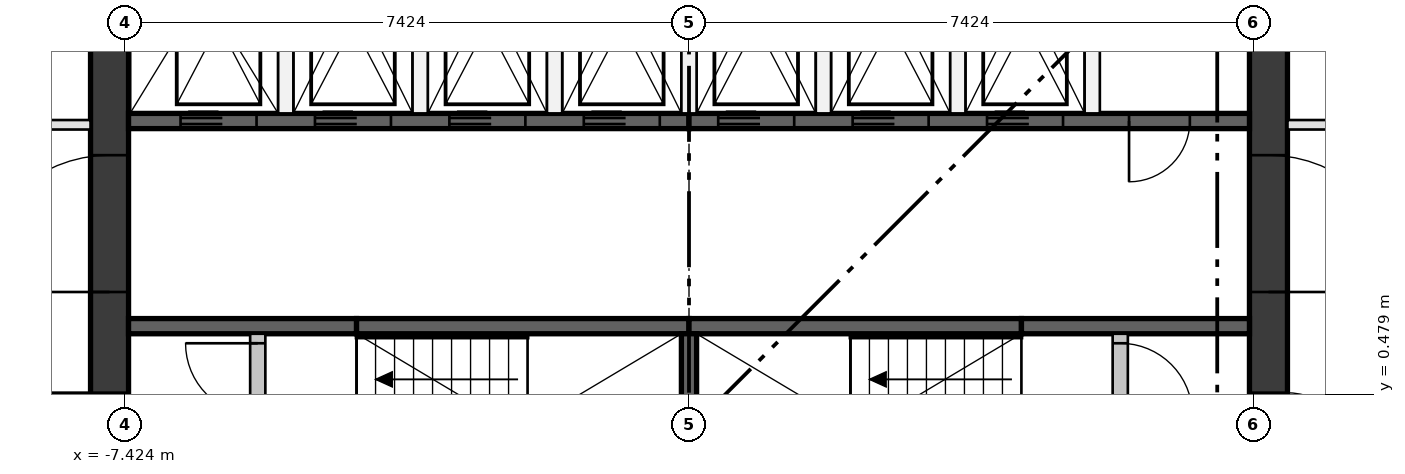
"""IFC4 building model, lengths in metres.
Left out: names, types, materials, properties, quantities, classifications, styles, units other than length and angle.
Written with IfcOpenShell. Run it as: python <this file> out.ifc"""

import sys

from ifc_helpers import new_model, si_unit, direction, frame, frame_2d, origin, place, context, subcontext, project, spatial, rectangle, extrude, element, fill, save


model = new_model("IFC4")
c1 = context("Model", 3, precision=1e-05, world=origin(), true_north=direction((0.0, 1.0)))
c2 = subcontext(c1, "Body", "Model", "MODEL_VIEW")
j1 = project(units=[si_unit("LENGTHUNIT", "METRE"), si_unit("PLANEANGLEUNIT", "RADIAN")], contexts=[c1])
p1 = place(None, origin())
s1 = spatial("IfcSite", under=j1, at=p1, CompositionType="ELEMENT")
p2 = place(p1, origin())
s2 = spatial("IfcBuilding", under=s1, at=p2, CompositionType="ELEMENT")
p3 = place(p2, frame((0.0, 0.0, 217.8)))
s3 = spatial("IfcBuildingStorey", under=s2, at=p3, CompositionType="ELEMENT", Elevation=217.8)
p4 = place(p3, frame((-7.624, -7.374, 0.0), z_axis=(0.0, 0.0, 1.0), x_axis=(0.0, 1.0, 0.0)))
e1 = element("IfcWall", 1, at=p4, inside=s3, PredefinedType="SHEAR", context=c2, shape_type="SweptSolid", body=[
    extrude(rectangle(XDim=14.748, YDim=0.5, at=frame_2d((7.374, 0.0))), origin(), (0.0, 0.0, 1.0), 3.35),
])
p5 = place(p4, frame((6.874, 0.0, 0.0)))
e2 = element("IfcOpeningElement", 2, at=p5, cuts=e1, PredefinedType="OPENING", context=c2, shape_type="SweptSolid", body=[
    extrude(rectangle(XDim=1.0, YDim=2.1, at=frame_2d((0.5, 1.05))), frame((0.0, 0.26, 0.0), z_axis=(0.0, -1.0, 0.0), x_axis=(1.0, 0.0, 0.0)), (0.0, 0.0, 1.0), 0.52),
])
p6 = place(p4, frame((3.75, 0.0, 0.0)))
e3 = element("IfcOpeningElement", 3, at=p6, cuts=e1, PredefinedType="OPENING", context=c2, shape_type="SweptSolid", body=[
    extrude(rectangle(XDim=1.8, YDim=2.1, at=frame_2d((0.9, 1.05))), frame((0.0, 0.26, 0.0), z_axis=(0.0, -1.0, 0.0), x_axis=(1.0, 0.0, 0.0)), (0.0, 0.0, 1.0), 0.52),
])
p7 = place(p4, frame((9.198, 0.0, 0.0)))
e4 = element("IfcOpeningElement", 4, at=p7, cuts=e1, PredefinedType="OPENING", context=c2, shape_type="SweptSolid", body=[
    extrude(rectangle(XDim=1.8, YDim=2.1, at=frame_2d((0.9, 1.05))), frame((0.0, 0.26, 0.0), z_axis=(0.0, -1.0, 0.0), x_axis=(1.0, 0.0, 0.0)), (0.0, 0.0, 1.0), 0.52),
])
p8 = place(p3, frame((7.624, -7.374, 0.0), z_axis=(0.0, 0.0, 1.0), x_axis=(0.0, 1.0, 0.0)))
e5 = element("IfcWall", 5, at=p8, inside=s3, PredefinedType="SHEAR", context=c2, shape_type="SweptSolid", body=[
    extrude(rectangle(XDim=14.748, YDim=0.5, at=frame_2d((7.374, 0.0))), origin(), (0.0, 0.0, 1.0), 3.35),
])
p9 = place(p8, frame((6.874, 0.0, 0.0)))
e6 = element("IfcOpeningElement", 6, at=p9, cuts=e5, PredefinedType="OPENING", context=c2, shape_type="SweptSolid", body=[
    extrude(rectangle(XDim=1.0, YDim=2.1, at=frame_2d((0.5, 1.05))), frame((0.0, 0.26, 0.0), z_axis=(0.0, -1.0, 0.0), x_axis=(1.0, 0.0, 0.0)), (0.0, 0.0, 1.0), 0.52),
])
p10 = place(p8, frame((3.75, 0.0, 0.0)))
e7 = element("IfcOpeningElement", 7, at=p10, cuts=e5, PredefinedType="OPENING", context=c2, shape_type="SweptSolid", body=[
    extrude(rectangle(XDim=1.8, YDim=2.1, at=frame_2d((0.9, 1.05))), frame((0.0, 0.26, 0.0), z_axis=(0.0, -1.0, 0.0), x_axis=(1.0, 0.0, 0.0)), (0.0, 0.0, 1.0), 0.52),
])
p11 = place(p8, frame((9.198, 0.0, 0.0)))
e8 = element("IfcOpeningElement", 8, at=p11, cuts=e5, PredefinedType="OPENING", context=c2, shape_type="SweptSolid", body=[
    extrude(rectangle(XDim=1.8, YDim=2.1, at=frame_2d((0.9, 1.05))), frame((0.0, 0.26, 0.0), z_axis=(0.0, -1.0, 0.0), x_axis=(1.0, 0.0, 0.0)), (0.0, 0.0, 1.0), 0.52),
])
p12 = place(p3, frame((-7.374, 4.074, 0.0), z_axis=(0.0, 0.0, 1.0), x_axis=(1.0, 0.0, 0.0)))
e9 = element("IfcWall", 9, at=p12, inside=s3, PredefinedType="SHEAR", context=c2, shape_type="SweptSolid", body=[
    extrude(rectangle(XDim=7.374, YDim=0.2, at=frame_2d((3.687, 0.0))), origin(), (0.0, 0.0, 1.0), 3.0),
])
p13 = place(p12, frame((0.684, 0.0, 0.0)))
e10 = element("IfcOpeningElement", 10, at=p13, cuts=e9, PredefinedType="OPENING", context=c2, shape_type="SweptSolid", body=[
    extrude(rectangle(XDim=1.0, YDim=2.1, at=frame_2d((0.5, 1.05))), frame((0.0, 0.11, 0.0), z_axis=(0.0, -1.0, 0.0), x_axis=(1.0, 0.0, 0.0)), (0.0, 0.0, 1.0), 0.22),
])
p14 = place(p12, frame((2.453, 0.0, 0.0)))
e11 = element("IfcOpeningElement", 11, at=p14, cuts=e9, PredefinedType="OPENING", context=c2, shape_type="SweptSolid", body=[
    extrude(rectangle(XDim=1.0, YDim=2.1, at=frame_2d((0.5, 1.05))), frame((0.0, 0.11, 0.0), z_axis=(0.0, -1.0, 0.0), x_axis=(1.0, 0.0, 0.0)), (0.0, 0.0, 1.0), 0.22),
])
p15 = place(p12, frame((4.221, 0.0, 0.0)))
e12 = element("IfcOpeningElement", 12, at=p15, cuts=e9, PredefinedType="OPENING", context=c2, shape_type="SweptSolid", body=[
    extrude(rectangle(XDim=1.0, YDim=2.1, at=frame_2d((0.5, 1.05))), frame((0.0, 0.11, 0.0), z_axis=(0.0, -1.0, 0.0), x_axis=(1.0, 0.0, 0.0)), (0.0, 0.0, 1.0), 0.22),
])
p16 = place(p12, frame((5.99, 0.0, 0.0)))
e13 = element("IfcOpeningElement", 13, at=p16, cuts=e9, PredefinedType="OPENING", context=c2, shape_type="SweptSolid", body=[
    extrude(rectangle(XDim=1.0, YDim=2.1, at=frame_2d((0.5, 1.05))), frame((0.0, 0.11, 0.0), z_axis=(0.0, -1.0, 0.0), x_axis=(1.0, 0.0, 0.0)), (0.0, 0.0, 1.0), 0.22),
])
p17 = place(p3, frame((0.0, 4.074, 0.0), z_axis=(0.0, 0.0, 1.0), x_axis=(1.0, 0.0, 0.0)))
e14 = element("IfcWall", 14, at=p17, inside=s3, PredefinedType="SHEAR", context=c2, shape_type="SweptSolid", body=[
    extrude(rectangle(XDim=7.374, YDim=0.2, at=frame_2d((3.687, 0.0))), origin(), (0.0, 0.0, 1.0), 3.0),
])
p18 = place(p17, frame((0.384, 0.0, 0.0)))
e15 = element("IfcOpeningElement", 15, at=p18, cuts=e14, PredefinedType="OPENING", context=c2, shape_type="SweptSolid", body=[
    extrude(rectangle(XDim=1.0, YDim=2.1, at=frame_2d((0.5, 1.05))), frame((0.0, 0.11, 0.0), z_axis=(0.0, -1.0, 0.0), x_axis=(1.0, 0.0, 0.0)), (0.0, 0.0, 1.0), 0.22),
])
p19 = place(p17, frame((2.153, 0.0, 0.0)))
e16 = element("IfcOpeningElement", 16, at=p19, cuts=e14, PredefinedType="OPENING", context=c2, shape_type="SweptSolid", body=[
    extrude(rectangle(XDim=1.0, YDim=2.1, at=frame_2d((0.5, 1.05))), frame((0.0, 0.11, 0.0), z_axis=(0.0, -1.0, 0.0), x_axis=(1.0, 0.0, 0.0)), (0.0, 0.0, 1.0), 0.22),
])
p20 = place(p17, frame((3.921, 0.0, 0.0)))
e17 = element("IfcOpeningElement", 17, at=p20, cuts=e14, PredefinedType="OPENING", context=c2, shape_type="SweptSolid", body=[
    extrude(rectangle(XDim=1.0, YDim=2.1, at=frame_2d((0.5, 1.05))), frame((0.0, 0.11, 0.0), z_axis=(0.0, -1.0, 0.0), x_axis=(1.0, 0.0, 0.0)), (0.0, 0.0, 1.0), 0.22),
])
p21 = place(p17, frame((5.79, 0.0, 0.0)))
e18 = element("IfcOpeningElement", 18, at=p21, cuts=e14, PredefinedType="OPENING", context=c2, shape_type="SweptSolid", body=[
    extrude(rectangle(XDim=0.8, YDim=2.1, at=frame_2d((0.4, 1.05))), frame((0.0, 0.11, 0.0), z_axis=(0.0, -1.0, 0.0), x_axis=(1.0, 0.0, 0.0)), (0.0, 0.0, 1.0), 0.22),
])
p22 = place(p3, frame((-7.374, 1.375, 0.0), z_axis=(0.0, 0.0, 1.0), x_axis=(1.0, 0.0, 0.0)))
e19 = element("IfcWall", 19, at=p22, inside=s3, PredefinedType="SHEAR", context=c2, shape_type="SweptSolid", body=[
    extrude(rectangle(XDim=3.0, YDim=0.2, at=frame_2d((1.5, 0.0))), origin(), (0.0, 0.0, 1.0), 3.0),
])
for number, where, z_axis, x_axis in (
    (20, (-4.374, 1.375, 0.0), (0.0, 0.0, 1.0), (1.0, 0.0, 0.0)),
    (21, (0.0, 1.375, 0.0), (0.0, 0.0, 1.0), (1.0, 0.0, 0.0)),
):
    element("IfcWall", number, at=place(p3, frame(where, z_axis=z_axis, x_axis=x_axis)), inside=s3, PredefinedType="SHEAR", context=c2, shape_type="SweptSolid", body=[
        extrude(rectangle(XDim=4.374, YDim=0.2, at=frame_2d((2.187, 0.0))), origin(), (0.0, 0.0, 1.0), 3.0),
    ])
p23 = place(p3, frame((4.374, 1.375, 0.0), z_axis=(0.0, 0.0, 1.0), x_axis=(1.0, 0.0, 0.0)))
e22 = element("IfcWall", 22, at=p23, inside=s3, PredefinedType="SHEAR", context=c2, shape_type="SweptSolid", body=[
    extrude(rectangle(XDim=3.0, YDim=0.2, at=frame_2d((1.5, 0.0))), origin(), (0.0, 0.0, 1.0), 3.0),
])
p24 = place(p3, frame((0.0, -1.275, 0.0), z_axis=(0.0, 0.0, 1.0), x_axis=(0.0, 1.0, 0.0)))
e23 = element("IfcWall", 23, at=p24, inside=s3, PredefinedType="SHEAR", context=c2, shape_type="SweptSolid", body=[
    extrude(rectangle(XDim=2.55, YDim=0.2, at=frame_2d((1.275, 0.0))), origin(), (0.0, 0.0, 1.0), 3.0),
])
for number, where, z_axis, x_axis in (
    (24, (-5.305, 4.174, 0.0), (0.0, 0.0, 1.0), (0.0, 1.0, 0.0)),
    (25, (-3.537, 4.174, 0.0), (0.0, 0.0, 1.0), (0.0, 1.0, 0.0)),
    (26, (-1.769, 4.174, 0.0), (0.0, 0.0, 1.0), (0.0, 1.0, 0.0)),
    (27, (0.0, 4.174, 0.0), (0.0, 0.0, 1.0), (0.0, 1.0, 0.0)),
    (28, (1.769, 4.174, 0.0), (0.0, 0.0, 1.0), (0.0, 1.0, 0.0)),
    (29, (3.537, 4.174, 0.0), (0.0, 0.0, 1.0), (0.0, 1.0, 0.0)),
    (30, (5.305, 4.174, 0.0), (0.0, 0.0, 1.0), (0.0, 1.0, 0.0)),
):
    element("IfcWall", number, at=place(p3, frame(where, z_axis=z_axis, x_axis=x_axis)), inside=s3, PredefinedType="PARTITIONING", context=c2, shape_type="SweptSolid", body=[
        extrude(rectangle(XDim=3.2, YDim=0.2, at=frame_2d((1.6, 0.0))), origin(), (0.0, 0.0, 1.0), 3.0),
    ])
p25 = place(p3, frame((-5.674, -1.275, 0.0), z_axis=(0.0, 0.0, 1.0), x_axis=(0.0, 1.0, 0.0)))
e31 = element("IfcWall", 31, at=p25, inside=s3, PredefinedType="PARTITIONING", context=c2, shape_type="SweptSolid", body=[
    extrude(rectangle(XDim=2.55, YDim=0.2, at=frame_2d((1.275, 0.0))), origin(), (0.0, 0.0, 1.0), 3.0),
])
p26 = place(p25, frame((0.125, 0.0, 0.0)))
e32 = element("IfcOpeningElement", 32, at=p26, cuts=e31, PredefinedType="OPENING", context=c2, shape_type="SweptSolid", body=[
    extrude(rectangle(XDim=0.95, YDim=2.1, at=frame_2d((0.475, 1.05))), frame((0.0, 0.11, 0.0), z_axis=(0.0, -1.0, 0.0), x_axis=(1.0, 0.0, 0.0)), (0.0, 0.0, 1.0), 0.22),
])
p27 = place(p25, frame((1.475, 0.0, 0.0)))
e33 = element("IfcOpeningElement", 33, at=p27, cuts=e31, PredefinedType="OPENING", context=c2, shape_type="SweptSolid", body=[
    extrude(rectangle(XDim=0.95, YDim=2.1, at=frame_2d((0.475, 1.05))), frame((0.0, 0.11, 0.0), z_axis=(0.0, -1.0, 0.0), x_axis=(1.0, 0.0, 0.0)), (0.0, 0.0, 1.0), 0.22),
])
p28 = place(p3, frame((5.674, -1.275, 0.0), z_axis=(0.0, 0.0, 1.0), x_axis=(0.0, 1.0, 0.0)))
e34 = element("IfcWall", 34, at=p28, inside=s3, PredefinedType="PARTITIONING", context=c2, shape_type="SweptSolid", body=[
    extrude(rectangle(XDim=2.55, YDim=0.2, at=frame_2d((1.275, 0.0))), origin(), (0.0, 0.0, 1.0), 3.0),
])
p29 = place(p28, frame((0.125, 0.0, 0.0)))
e35 = element("IfcOpeningElement", 35, at=p29, cuts=e34, PredefinedType="OPENING", context=c2, shape_type="SweptSolid", body=[
    extrude(rectangle(XDim=0.95, YDim=2.1, at=frame_2d((0.475, 1.05))), frame((0.0, 0.11, 0.0), z_axis=(0.0, -1.0, 0.0), x_axis=(1.0, 0.0, 0.0)), (0.0, 0.0, 1.0), 0.22),
])
p30 = place(p28, frame((1.475, 0.0, 0.0)))
e36 = element("IfcOpeningElement", 36, at=p30, cuts=e34, PredefinedType="OPENING", context=c2, shape_type="SweptSolid", body=[
    extrude(rectangle(XDim=0.95, YDim=2.1, at=frame_2d((0.475, 1.05))), frame((0.0, 0.11, 0.0), z_axis=(0.0, -1.0, 0.0), x_axis=(1.0, 0.0, 0.0)), (0.0, 0.0, 1.0), 0.22),
])
p31 = place(p3, frame((7.874, 4.024, 0.0), z_axis=(0.0, 0.0, 1.0), x_axis=(1.0, 0.0, 0.0)))
e37 = element("IfcWall", 37, at=p31, inside=s3, PredefinedType="PARTITIONING", context=c2, shape_type="SweptSolid", body=[
    extrude(rectangle(XDim=2.317, YDim=0.125, at=frame_2d((1.158, 0.0))), origin(), (0.0, 0.0, 1.0), 3.0),
])
p32 = place(p31, frame((0.7, 0.0, 0.0)))
e38 = element("IfcOpeningElement", 38, at=p32, cuts=e37, PredefinedType="OPENING", context=c2, shape_type="SweptSolid", body=[
    extrude(rectangle(XDim=1.0, YDim=2.1, at=frame_2d((0.5, 1.05))), frame((0.0, 0.073, 0.0), z_axis=(0.0, -1.0, 0.0), x_axis=(1.0, 0.0, 0.0)), (0.0, 0.0, 1.0), 0.145),
])
p33 = place(p3, frame((-10.296, 4.024, 0.0), z_axis=(0.0, 0.0, 1.0), x_axis=(1.0, 0.0, 0.0)))
e39 = element("IfcWall", 39, at=p33, inside=s3, PredefinedType="PARTITIONING", context=c2, shape_type="SweptSolid", body=[
    extrude(rectangle(XDim=2.422, YDim=0.125, at=frame_2d((1.211, 0.0))), origin(), (0.0, 0.0, 1.0), 3.0),
])
p34 = place(p33, frame((0.7, 0.0, 0.0)))
e40 = element("IfcOpeningElement", 40, at=p34, cuts=e39, PredefinedType="OPENING", context=c2, shape_type="SweptSolid", body=[
    extrude(rectangle(XDim=1.0, YDim=2.1, at=frame_2d((0.5, 1.05))), frame((0.0, 0.073, 0.0), z_axis=(0.0, -1.0, 0.0), x_axis=(1.0, 0.0, 0.0)), (0.0, 0.0, 1.0), 0.145),
])
p35 = place(p13, frame((1.0, 0.0, 0.0), z_axis=(0.0, 0.0, 1.0), x_axis=(-1.0, 0.0, 0.0)))
e41 = element("IfcDoor", 41, at=p35, inside=s3, OperationType="DOUBLE_DOOR_SLIDING", PredefinedType="DOOR", context=c2, shape_type="SweptSolid", body=[
    extrude(rectangle(XDim=1.0, YDim=2.1, at=frame_2d((0.5, 1.05))), frame((0.0, 0.025, 0.0), z_axis=(0.0, -1.0, 0.0), x_axis=(1.0, 0.0, 0.0)), (0.0, 0.0, 1.0), 0.05),
])
fill(e10, e41)
p36 = place(p14, frame((1.0, 0.0, 0.0), z_axis=(0.0, 0.0, 1.0), x_axis=(-1.0, 0.0, 0.0)))
e42 = element("IfcDoor", 42, at=p36, inside=s3, OperationType="DOUBLE_DOOR_SLIDING", PredefinedType="DOOR", context=c2, shape_type="SweptSolid", body=[
    extrude(rectangle(XDim=1.0, YDim=2.1, at=frame_2d((0.5, 1.05))), frame((0.0, 0.025, 0.0), z_axis=(0.0, -1.0, 0.0), x_axis=(1.0, 0.0, 0.0)), (0.0, 0.0, 1.0), 0.05),
])
fill(e11, e42)
p37 = place(p15, frame((1.0, 0.0, 0.0), z_axis=(0.0, 0.0, 1.0), x_axis=(-1.0, 0.0, 0.0)))
e43 = element("IfcDoor", 43, at=p37, inside=s3, OperationType="DOUBLE_DOOR_SLIDING", PredefinedType="DOOR", context=c2, shape_type="SweptSolid", body=[
    extrude(rectangle(XDim=1.0, YDim=2.1, at=frame_2d((0.5, 1.05))), frame((0.0, 0.025, 0.0), z_axis=(0.0, -1.0, 0.0), x_axis=(1.0, 0.0, 0.0)), (0.0, 0.0, 1.0), 0.05),
])
fill(e12, e43)
p38 = place(p16, frame((1.0, 0.0, 0.0), z_axis=(0.0, 0.0, 1.0), x_axis=(-1.0, 0.0, 0.0)))
e44 = element("IfcDoor", 44, at=p38, inside=s3, OperationType="DOUBLE_DOOR_SLIDING", PredefinedType="DOOR", context=c2, shape_type="SweptSolid", body=[
    extrude(rectangle(XDim=1.0, YDim=2.1, at=frame_2d((0.5, 1.05))), frame((0.0, 0.025, 0.0), z_axis=(0.0, -1.0, 0.0), x_axis=(1.0, 0.0, 0.0)), (0.0, 0.0, 1.0), 0.05),
])
fill(e13, e44)
p39 = place(p18, frame((1.0, 0.0, 0.0), z_axis=(0.0, 0.0, 1.0), x_axis=(-1.0, 0.0, 0.0)))
e45 = element("IfcDoor", 45, at=p39, inside=s3, OperationType="DOUBLE_DOOR_SLIDING", PredefinedType="DOOR", context=c2, shape_type="SweptSolid", body=[
    extrude(rectangle(XDim=1.0, YDim=2.1, at=frame_2d((0.5, 1.05))), frame((0.0, 0.025, 0.0), z_axis=(0.0, -1.0, 0.0), x_axis=(1.0, 0.0, 0.0)), (0.0, 0.0, 1.0), 0.05),
])
fill(e15, e45)
p40 = place(p19, frame((1.0, 0.0, 0.0), z_axis=(0.0, 0.0, 1.0), x_axis=(-1.0, 0.0, 0.0)))
e46 = element("IfcDoor", 46, at=p40, inside=s3, OperationType="DOUBLE_DOOR_SLIDING", PredefinedType="DOOR", context=c2, shape_type="SweptSolid", body=[
    extrude(rectangle(XDim=1.0, YDim=2.1, at=frame_2d((0.5, 1.05))), frame((0.0, 0.025, 0.0), z_axis=(0.0, -1.0, 0.0), x_axis=(1.0, 0.0, 0.0)), (0.0, 0.0, 1.0), 0.05),
])
fill(e16, e46)
p41 = place(p20, frame((1.0, 0.0, 0.0), z_axis=(0.0, 0.0, 1.0), x_axis=(-1.0, 0.0, 0.0)))
e47 = element("IfcDoor", 47, at=p41, inside=s3, OperationType="DOUBLE_DOOR_SLIDING", PredefinedType="DOOR", context=c2, shape_type="SweptSolid", body=[
    extrude(rectangle(XDim=1.0, YDim=2.1, at=frame_2d((0.5, 1.05))), frame((0.0, 0.025, 0.0), z_axis=(0.0, -1.0, 0.0), x_axis=(1.0, 0.0, 0.0)), (0.0, 0.0, 1.0), 0.05),
])
fill(e17, e47)
p42 = place(p27, origin())
e48 = element("IfcDoor", 48, at=p42, inside=s3, OperationType="SINGLE_SWING_RIGHT", PredefinedType="DOOR", context=c2, shape_type="SweptSolid", body=[
    extrude(rectangle(XDim=0.95, YDim=2.1, at=frame_2d((0.475, 1.05))), frame((0.0, 0.025, 0.0), z_axis=(0.0, -1.0, 0.0), x_axis=(1.0, 0.0, 0.0)), (0.0, 0.0, 1.0), 0.05),
])
fill(e33, e48)
p43 = place(p30, frame((0.95, 0.0, 0.0), z_axis=(0.0, 0.0, 1.0), x_axis=(-1.0, 0.0, 0.0)))
e49 = element("IfcDoor", 49, at=p43, inside=s3, OperationType="SINGLE_SWING_LEFT", PredefinedType="DOOR", context=c2, shape_type="SweptSolid", body=[
    extrude(rectangle(XDim=0.95, YDim=2.1, at=frame_2d((0.475, 1.05))), frame((0.0, 0.025, 0.0), z_axis=(0.0, -1.0, 0.0), x_axis=(1.0, 0.0, 0.0)), (0.0, 0.0, 1.0), 0.05),
])
fill(e36, e49)
p44 = place(p21, frame((0.8, 0.0, 0.0), z_axis=(0.0, 0.0, 1.0), x_axis=(-1.0, 0.0, 0.0)))
e50 = element("IfcDoor", 50, at=p44, inside=s3, OperationType="SINGLE_SWING_LEFT", PredefinedType="DOOR", context=c2, shape_type="SweptSolid", body=[
    extrude(rectangle(XDim=0.8, YDim=2.1, at=frame_2d((0.4, 1.05))), frame((0.0, 0.025, 0.0), z_axis=(0.0, -1.0, 0.0), x_axis=(1.0, 0.0, 0.0)), (0.0, 0.0, 1.0), 0.05),
])
fill(e18, e50)
p45 = place(p5, origin())
e51 = element("IfcDoor", 51, at=p45, inside=s3, OperationType="SINGLE_SWING_RIGHT", PredefinedType="DOOR", context=c2, shape_type="SweptSolid", body=[
    extrude(rectangle(XDim=1.0, YDim=2.1, at=frame_2d((0.5, 1.05))), frame((0.0, 0.25, 0.0), z_axis=(0.0, -1.0, 0.0), x_axis=(1.0, 0.0, 0.0)), (0.0, 0.0, 1.0), 0.05),
])
fill(e2, e51)
p46 = place(p7, origin())
e52 = element("IfcDoor", 52, at=p46, inside=s3, OperationType="DOUBLE_DOOR_SINGLE_SWING", PredefinedType="DOOR", context=c2, shape_type="SweptSolid", body=[
    extrude(rectangle(XDim=1.8, YDim=2.1, at=frame_2d((0.9, 1.05))), frame((0.0, 0.025, 0.0), z_axis=(0.0, -1.0, 0.0), x_axis=(1.0, 0.0, 0.0)), (0.0, 0.0, 1.0), 0.05),
])
fill(e4, e52)
p47 = place(p9, frame((1.0, 0.0, 0.0), z_axis=(0.0, 0.0, 1.0), x_axis=(-1.0, 0.0, 0.0)))
e53 = element("IfcDoor", 53, at=p47, inside=s3, OperationType="SINGLE_SWING_LEFT", PredefinedType="DOOR", context=c2, shape_type="SweptSolid", body=[
    extrude(rectangle(XDim=1.0, YDim=2.1, at=frame_2d((0.5, 1.05))), frame((0.0, 0.25, 0.0), z_axis=(0.0, -1.0, 0.0), x_axis=(1.0, 0.0, 0.0)), (0.0, 0.0, 1.0), 0.05),
])
fill(e6, e53)
p48 = place(p11, frame((1.8, 0.0, 0.0), z_axis=(0.0, 0.0, 1.0), x_axis=(-1.0, 0.0, 0.0)))
e54 = element("IfcDoor", 54, at=p48, inside=s3, OperationType="DOUBLE_DOOR_SINGLE_SWING", PredefinedType="DOOR", context=c2, shape_type="SweptSolid", body=[
    extrude(rectangle(XDim=1.8, YDim=2.1, at=frame_2d((0.9, 1.05))), frame((0.0, 0.025, 0.0), z_axis=(0.0, -1.0, 0.0), x_axis=(1.0, 0.0, 0.0)), (0.0, 0.0, 1.0), 0.05),
])
fill(e8, e54)
save(model, sys.argv[1])
